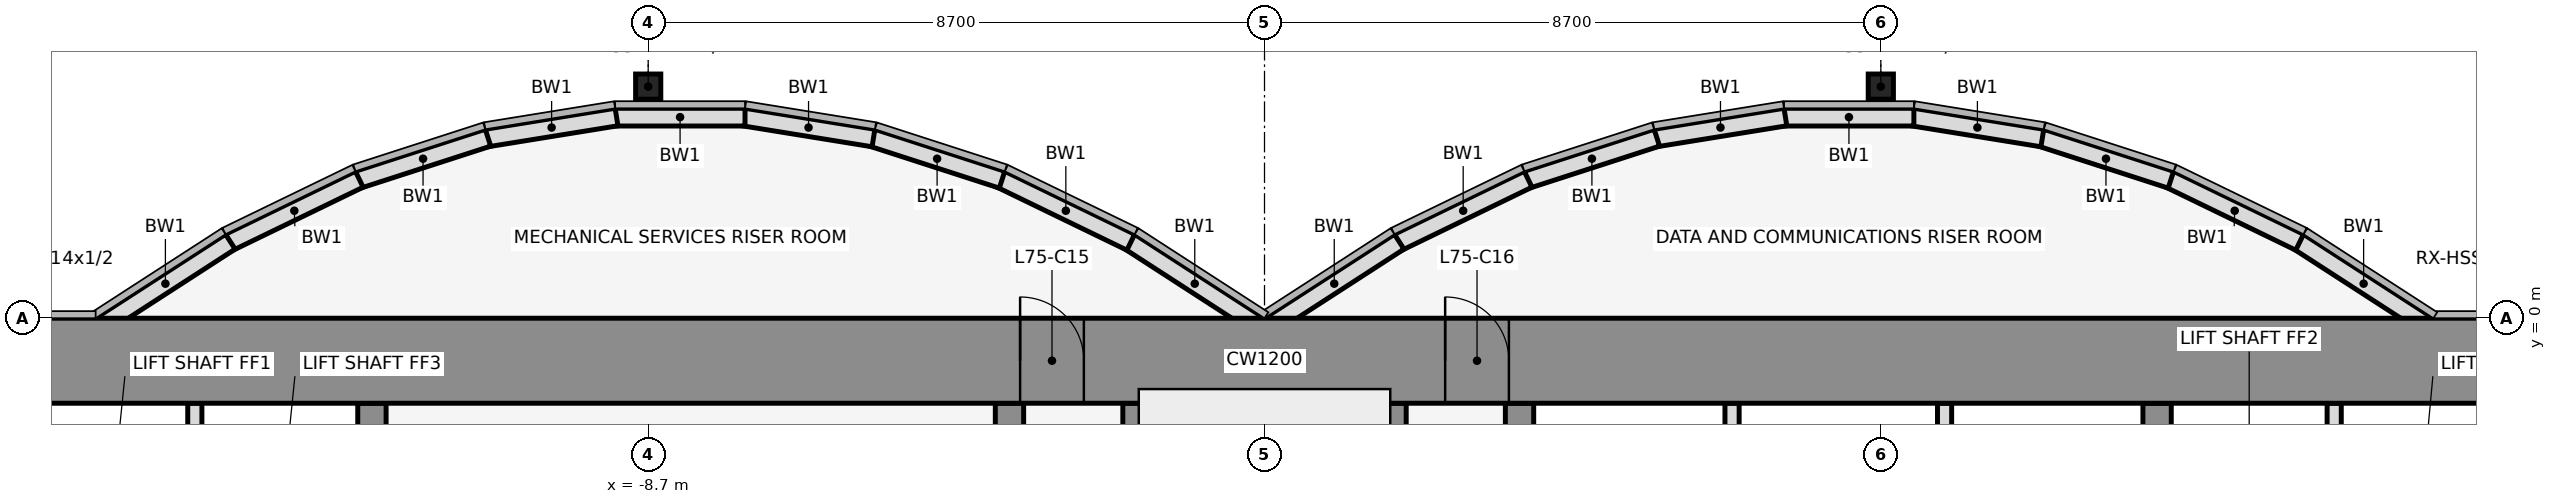
"""IFC4 building model, lengths in metres.
Left out: names, types, materials, properties, quantities, classifications, styles, units other than length and angle.
Written with IfcOpenShell. Run it as: python <this file> out.ifc"""

import sys

from ifc_helpers import new_model, si_unit, direction, frame, frame_2d, origin, origin_2d, place, context, subcontext, project, spatial, rectangle, hollow_rectangle, extrude, element, fill, save


model = new_model("IFC4")
c1 = context("Model", 3, precision=1e-05, world=origin(), true_north=direction((0.0, 1.0)))
c2 = subcontext(c1, "Body", "Model", "MODEL_VIEW")
j1 = project(units=[si_unit("LENGTHUNIT", "METRE"), si_unit("PLANEANGLEUNIT", "RADIAN")], contexts=[c1])
p1 = place(None, origin())
s1 = spatial("IfcSite", under=j1, at=p1, CompositionType="ELEMENT")
p2 = place(p1, origin())
s2 = spatial("IfcBuilding", under=s1, at=p2, CompositionType="ELEMENT")
p3 = place(p2, frame((0.0, 0.0, 333.5)))
s3 = spatial("IfcBuildingStorey", under=s2, at=p3, CompositionType="ELEMENT", Elevation=333.5)
for number, where, z_axis, x_axis in (
    (1, (-8.7, 3.269, 0.0), (0.0, 0.0, 1.0), (1.0, 0.0, 0.0)),
    (2, (8.7, 3.269, 0.0), (0.0, 0.0, 1.0), (1.0, 0.0, 0.0)),
):
    element("IfcColumn", number, at=place(p3, frame(where, z_axis=z_axis, x_axis=x_axis)), inside=s3, PredefinedType="COLUMN", context=c2, shape_type="SweptSolid", body=[
        extrude(hollow_rectangle(XDim=0.356, YDim=0.356, WallThickness=0.012, at=origin_2d()), origin(), (0.0, 0.0, 1.0), 4.5),
    ])
p4 = place(p3, frame((16.432, -0.105, 0.0), z_axis=(0.0, 0.0, 1.0), x_axis=(-0.83981312244, 0.542875602121, 0.0)))
e3 = element("IfcWall", 3, at=p4, inside=s3, PredefinedType="STANDARD", context=c2, shape_type="SweptSolid", body=[
    extrude(rectangle(XDim=2.183, YDim=0.25, at=frame_2d((1.091, 0.0))), origin(), (0.0, 0.0, 1.0), 4.35),
])
p5 = place(p3, frame((14.612, 1.073, 0.0), z_axis=(0.0, 0.0, 1.0), x_axis=(-0.89982408427, 0.436252928206, 0.0)))
e4 = element("IfcWall", 4, at=p5, inside=s3, PredefinedType="STANDARD", context=c2, shape_type="SweptSolid", body=[
    extrude(rectangle(XDim=2.038, YDim=0.25, at=frame_2d((1.019, 0.0))), origin(), (0.0, 0.0, 1.0), 4.35),
])
p6 = place(p3, frame((12.795, 1.955, 0.0), z_axis=(0.0, 0.0, 1.0), x_axis=(-0.951495806175, 0.307661714928, 0.0)))
e5 = element("IfcWall", 5, at=p6, inside=s3, PredefinedType="STANDARD", context=c2, shape_type="SweptSolid", body=[
    extrude(rectangle(XDim=1.927, YDim=0.25, at=frame_2d((0.963, 0.0))), origin(), (0.0, 0.0, 1.0), 4.35),
])
p7 = place(p3, frame((10.98, 2.543, 0.0), z_axis=(0.0, 0.0, 1.0), x_axis=(-0.987181718931, 0.159600293885, 0.0)))
e6 = element("IfcWall", 6, at=p7, inside=s3, PredefinedType="STANDARD", context=c2, shape_type="SweptSolid", body=[
    extrude(rectangle(XDim=1.857, YDim=0.25, at=frame_2d((0.929, 0.0))), origin(), (0.0, 0.0, 1.0), 4.35),
])
p8 = place(p3, frame((9.167, 2.838, 0.0), z_axis=(0.0, 0.0, 1.0), x_axis=(-1.0, 0.0, 0.0)))
e7 = element("IfcWall", 7, at=p8, inside=s3, PredefinedType="STANDARD", context=c2, shape_type="SweptSolid", body=[
    extrude(rectangle(XDim=1.833, YDim=0.25, at=frame_2d((0.917, 0.0))), origin(), (0.0, 0.0, 1.0), 4.35),
])
p9 = place(p3, frame((7.353, 2.84, 0.0), z_axis=(0.0, 0.0, 1.0), x_axis=(-0.987181718931, -0.159600293885, 0.0)))
e8 = element("IfcWall", 8, at=p9, inside=s3, PredefinedType="STANDARD", context=c2, shape_type="SweptSolid", body=[
    extrude(rectangle(XDim=1.857, YDim=0.25, at=frame_2d((0.929, 0.0))), origin(), (0.0, 0.0, 1.0), 4.35),
])
p10 = place(p3, frame((5.538, 2.548, 0.0), z_axis=(0.0, 0.0, 1.0), x_axis=(-0.951495806175, -0.307661714928, 0.0)))
e9 = element("IfcWall", 9, at=p10, inside=s3, PredefinedType="STANDARD", context=c2, shape_type="SweptSolid", body=[
    extrude(rectangle(XDim=1.927, YDim=0.25, at=frame_2d((0.963, 0.0))), origin(), (0.0, 0.0, 1.0), 4.35),
])
p11 = place(p3, frame((3.721, 1.962, 0.0), z_axis=(0.0, 0.0, 1.0), x_axis=(-0.89982408427, -0.436252928206, 0.0)))
e10 = element("IfcWall", 10, at=p11, inside=s3, PredefinedType="STANDARD", context=c2, shape_type="SweptSolid", body=[
    extrude(rectangle(XDim=2.038, YDim=0.25, at=frame_2d((1.019, 0.0))), origin(), (0.0, 0.0, 1.0), 4.35),
])
for number, where, z_axis, x_axis in (
    (11, (1.901, 1.08, 0.0), (0.0, 0.0, 1.0), (-0.84, -0.543, 0.0)),
    (12, (-0.068, -0.105, 0.0), (0.0, 0.0, 1.0), (-0.84, 0.543, 0.0)),
):
    element("IfcWall", number, at=place(p3, frame(where, z_axis=z_axis, x_axis=x_axis)), inside=s3, PredefinedType="STANDARD", context=c2, shape_type="SweptSolid", body=[
        extrude(rectangle(XDim=2.183, YDim=0.25, at=frame_2d((1.091, 0.0))), origin(), (0.0, 0.0, 1.0), 4.35),
    ])
p12 = place(p3, frame((-1.888, 1.073, 0.0), z_axis=(0.0, 0.0, 1.0), x_axis=(-0.89982408427, 0.436252928206, 0.0)))
e13 = element("IfcWall", 13, at=p12, inside=s3, PredefinedType="STANDARD", context=c2, shape_type="SweptSolid", body=[
    extrude(rectangle(XDim=2.038, YDim=0.25, at=frame_2d((1.019, 0.0))), origin(), (0.0, 0.0, 1.0), 4.35),
])
p13 = place(p3, frame((-3.705, 1.955, 0.0), z_axis=(0.0, 0.0, 1.0), x_axis=(-0.951495806175, 0.307661714928, 0.0)))
e14 = element("IfcWall", 14, at=p13, inside=s3, PredefinedType="STANDARD", context=c2, shape_type="SweptSolid", body=[
    extrude(rectangle(XDim=1.927, YDim=0.25, at=frame_2d((0.963, 0.0))), origin(), (0.0, 0.0, 1.0), 4.35),
])
p14 = place(p3, frame((-5.52, 2.543, 0.0), z_axis=(0.0, 0.0, 1.0), x_axis=(-0.987181718931, 0.159600293885, 0.0)))
e15 = element("IfcWall", 15, at=p14, inside=s3, PredefinedType="STANDARD", context=c2, shape_type="SweptSolid", body=[
    extrude(rectangle(XDim=1.857, YDim=0.25, at=frame_2d((0.929, 0.0))), origin(), (0.0, 0.0, 1.0), 4.35),
])
p15 = place(p3, frame((-7.333, 2.838, 0.0), z_axis=(0.0, 0.0, 1.0), x_axis=(-1.0, 0.0, 0.0)))
e16 = element("IfcWall", 16, at=p15, inside=s3, PredefinedType="STANDARD", context=c2, shape_type="SweptSolid", body=[
    extrude(rectangle(XDim=1.833, YDim=0.25, at=frame_2d((0.917, 0.0))), origin(), (0.0, 0.0, 1.0), 4.35),
])
p16 = place(p3, frame((-9.147, 2.84, 0.0), z_axis=(0.0, 0.0, 1.0), x_axis=(-0.987181718931, -0.159600293885, 0.0)))
e17 = element("IfcWall", 17, at=p16, inside=s3, PredefinedType="STANDARD", context=c2, shape_type="SweptSolid", body=[
    extrude(rectangle(XDim=1.857, YDim=0.25, at=frame_2d((0.929, 0.0))), origin(), (0.0, 0.0, 1.0), 4.35),
])
p17 = place(p3, frame((-10.962, 2.548, 0.0), z_axis=(0.0, 0.0, 1.0), x_axis=(-0.951495806175, -0.307661714928, 0.0)))
e18 = element("IfcWall", 18, at=p17, inside=s3, PredefinedType="STANDARD", context=c2, shape_type="SweptSolid", body=[
    extrude(rectangle(XDim=1.927, YDim=0.25, at=frame_2d((0.963, 0.0))), origin(), (0.0, 0.0, 1.0), 4.35),
])
p18 = place(p3, frame((-12.779, 1.962, 0.0), z_axis=(0.0, 0.0, 1.0), x_axis=(-0.89982408427, -0.436252928206, 0.0)))
e19 = element("IfcWall", 19, at=p18, inside=s3, PredefinedType="STANDARD", context=c2, shape_type="SweptSolid", body=[
    extrude(rectangle(XDim=2.038, YDim=0.25, at=frame_2d((1.019, 0.0))), origin(), (0.0, 0.0, 1.0), 4.35),
])
p19 = place(p3, frame((-14.599, 1.08, 0.0), z_axis=(0.0, 0.0, 1.0), x_axis=(-0.83981312244, -0.542875602121, 0.0)))
e20 = element("IfcWall", 20, at=p19, inside=s3, PredefinedType="STANDARD", context=c2, shape_type="SweptSolid", body=[
    extrude(rectangle(XDim=2.183, YDim=0.25, at=frame_2d((1.091, 0.0))), origin(), (0.0, 0.0, 1.0), 4.35),
])
p20 = place(p3, frame((-15.1, -4.6, 0.0), z_axis=(0.0, 0.0, 1.0), x_axis=(0.0, 1.0, 0.0)))
e21 = element("IfcWall", 21, at=p20, inside=s3, PredefinedType="PARTITIONING", context=c2, shape_type="SweptSolid", body=[
    extrude(rectangle(XDim=3.4, YDim=0.2, at=frame_2d((1.7, 0.0))), origin(), (0.0, 0.0, 1.0), 3.339),
])
p21 = place(p3, frame((-12.6, -11.8, 0.0), z_axis=(0.0, 0.0, 1.0), x_axis=(0.0, 1.0, 0.0)))
e22 = element("IfcWall", 22, at=p21, inside=s3, PredefinedType="SHEAR", context=c2, shape_type="SweptSolid", body=[
    extrude(rectangle(XDim=10.6, YDim=0.4, at=frame_2d((5.3, 0.0))), origin(), (0.0, 0.0, 1.0), 4.5),
])
p22 = place(p21, frame((4.75, 0.0, 0.0)))
e23 = element("IfcOpeningElement", 23, at=p22, cuts=e22, PredefinedType="OPENING", context=c2, shape_type="SweptSolid", body=[
    extrude(rectangle(XDim=1.1, YDim=2.1, at=frame_2d((0.55, 1.05))), frame((0.0, 0.212, 0.0), z_axis=(0.0, -1.0, 0.0), x_axis=(1.0, 0.0, 0.0)), (0.0, 0.0, 1.0), 0.424),
])
p23 = place(p3, frame((-3.6, -11.8, 0.0), z_axis=(0.0, 0.0, 1.0), x_axis=(0.0, 1.0, 0.0)))
e24 = element("IfcWall", 24, at=p23, inside=s3, PredefinedType="SHEAR", context=c2, shape_type="SweptSolid", body=[
    extrude(rectangle(XDim=10.6, YDim=0.4, at=frame_2d((5.3, 0.0))), origin(), (0.0, 0.0, 1.0), 4.5),
])
p24 = place(p23, frame((4.85, 0.0, 0.0)))
e25 = element("IfcOpeningElement", 25, at=p24, cuts=e24, PredefinedType="OPENING", context=c2, shape_type="SweptSolid", body=[
    extrude(rectangle(XDim=0.9, YDim=2.1, at=frame_2d((0.45, 1.05))), frame((0.0, 0.212, 0.0), z_axis=(0.0, -1.0, 0.0), x_axis=(1.0, 0.0, 0.0)), (0.0, 0.0, 1.0), 0.424),
])
for number, where, z_axis, x_axis in (
    (26, (-1.8, -11.8, 0.0), (0.0, 0.0, 1.0), (0.0, 1.0, 0.0)),
    (27, (1.8, -11.8, 0.0), (0.0, 0.0, 1.0), (0.0, 1.0, 0.0)),
):
    element("IfcWall", number, at=place(p3, frame(where, z_axis=z_axis, x_axis=x_axis)), inside=s3, PredefinedType="SHEAR", context=c2, shape_type="SweptSolid", body=[
        extrude(rectangle(XDim=10.6, YDim=0.4, at=frame_2d((5.3, 0.0))), origin(), (0.0, 0.0, 1.0), 4.5),
    ])
p25 = place(p3, frame((3.6, -11.8, 0.0), z_axis=(0.0, 0.0, 1.0), x_axis=(0.0, 1.0, 0.0)))
e28 = element("IfcWall", 28, at=p25, inside=s3, PredefinedType="SHEAR", context=c2, shape_type="SweptSolid", body=[
    extrude(rectangle(XDim=10.6, YDim=0.4, at=frame_2d((5.3, 0.0))), origin(), (0.0, 0.0, 1.0), 4.5),
])
p26 = place(p25, frame((1.35, 0.0, 0.0)))
e29 = element("IfcOpeningElement", 29, at=p26, cuts=e28, PredefinedType="OPENING", context=c2, shape_type="SweptSolid", body=[
    extrude(rectangle(XDim=0.9, YDim=2.1, at=frame_2d((0.45, 1.05))), frame((0.0, 0.212, 0.0), z_axis=(0.0, -1.0, 0.0), x_axis=(1.0, 0.0, 0.0)), (0.0, 0.0, 1.0), 0.424),
])
for number, where, z_axis, x_axis in (
    (30, (6.6, -4.6, 0.0), (0.0, 0.0, 1.0), (0.0, 1.0, 0.0)),
    (31, (9.6, -4.6, 0.0), (0.0, 0.0, 1.0), (0.0, 1.0, 0.0)),
):
    element("IfcWall", number, at=place(p3, frame(where, z_axis=z_axis, x_axis=x_axis)), inside=s3, PredefinedType="PARTITIONING", context=c2, shape_type="SweptSolid", body=[
        extrude(rectangle(XDim=3.4, YDim=0.2, at=frame_2d((1.7, 0.0))), origin(), (0.0, 0.0, 1.0), 3.339),
    ])
p27 = place(p3, frame((12.6, -11.8, 0.0), z_axis=(0.0, 0.0, 1.0), x_axis=(0.0, 1.0, 0.0)))
e32 = element("IfcWall", 32, at=p27, inside=s3, PredefinedType="SHEAR", context=c2, shape_type="SweptSolid", body=[
    extrude(rectangle(XDim=10.6, YDim=0.4, at=frame_2d((5.3, 0.0))), origin(), (0.0, 0.0, 1.0), 4.5),
])
p28 = place(p27, frame((4.75, 0.0, 0.0)))
e33 = element("IfcOpeningElement", 33, at=p28, cuts=e32, PredefinedType="OPENING", context=c2, shape_type="SweptSolid", body=[
    extrude(rectangle(XDim=1.1, YDim=2.1, at=frame_2d((0.55, 1.05))), frame((0.0, 0.212, 0.0), z_axis=(0.0, -1.0, 0.0), x_axis=(1.0, 0.0, 0.0)), (0.0, 0.0, 1.0), 0.424),
])
p29 = place(p3, frame((15.1, -4.6, 0.0), z_axis=(0.0, 0.0, 1.0), x_axis=(0.0, 1.0, 0.0)))
e34 = element("IfcWall", 34, at=p29, inside=s3, PredefinedType="PARTITIONING", context=c2, shape_type="SweptSolid", body=[
    extrude(rectangle(XDim=3.4, YDim=0.2, at=frame_2d((1.7, 0.0))), origin(), (0.0, 0.0, 1.0), 3.339),
])
p30 = place(p3, frame((-22.0, -0.6, 0.0), z_axis=(0.0, 0.0, 1.0), x_axis=(1.0, 0.0, 0.0)))
e35 = element("IfcWall", 35, at=p30, inside=s3, PredefinedType="SHEAR", context=c2, shape_type="SweptSolid", body=[
    extrude(rectangle(XDim=44.0, YDim=1.2, at=frame_2d((22.0, 0.0))), origin(), (0.0, 0.0, 1.0), 4.5),
])
p31 = place(p30, frame((18.55, 0.0, 0.0)))
e36 = element("IfcOpeningElement", 36, at=p31, cuts=e35, PredefinedType="OPENING", context=c2, shape_type="SweptSolid", body=[
    extrude(rectangle(XDim=0.9, YDim=2.1, at=frame_2d((0.45, 1.05))), frame((0.0, 0.612, 0.0), z_axis=(0.0, -1.0, 0.0), x_axis=(1.0, 0.0, 0.0)), (0.0, 0.0, 1.0), 1.224),
])
p32 = place(p30, frame((24.55, 0.0, 0.0)))
e37 = element("IfcOpeningElement", 37, at=p32, cuts=e35, PredefinedType="OPENING", context=c2, shape_type="SweptSolid", body=[
    extrude(rectangle(XDim=0.9, YDim=2.1, at=frame_2d((0.45, 1.05))), frame((0.0, 0.612, 0.0), z_axis=(0.0, -1.0, 0.0), x_axis=(1.0, 0.0, 0.0)), (0.0, 0.0, 1.0), 1.224),
])
p33 = place(p31, origin())
e38 = element("IfcDoor", 38, at=p33, inside=s3, OperationType="SINGLE_SWING_LEFT", PredefinedType="DOOR", context=c2, shape_type="SweptSolid", body=[
    extrude(rectangle(XDim=0.9, YDim=2.1, at=frame_2d((0.45, 1.05))), frame((0.0, 0.025, 0.0), z_axis=(0.0, -1.0, 0.0), x_axis=(1.0, 0.0, 0.0)), (0.0, 0.0, 1.0), 0.05),
])
fill(e36, e38)
p34 = place(p32, origin())
e39 = element("IfcDoor", 39, at=p34, inside=s3, OperationType="SINGLE_SWING_LEFT", PredefinedType="DOOR", context=c2, shape_type="SweptSolid", body=[
    extrude(rectangle(XDim=0.9, YDim=2.1, at=frame_2d((0.45, 1.05))), frame((0.0, 0.025, 0.0), z_axis=(0.0, -1.0, 0.0), x_axis=(1.0, 0.0, 0.0)), (0.0, 0.0, 1.0), 0.05),
])
fill(e37, e39)
save(model, sys.argv[1])
